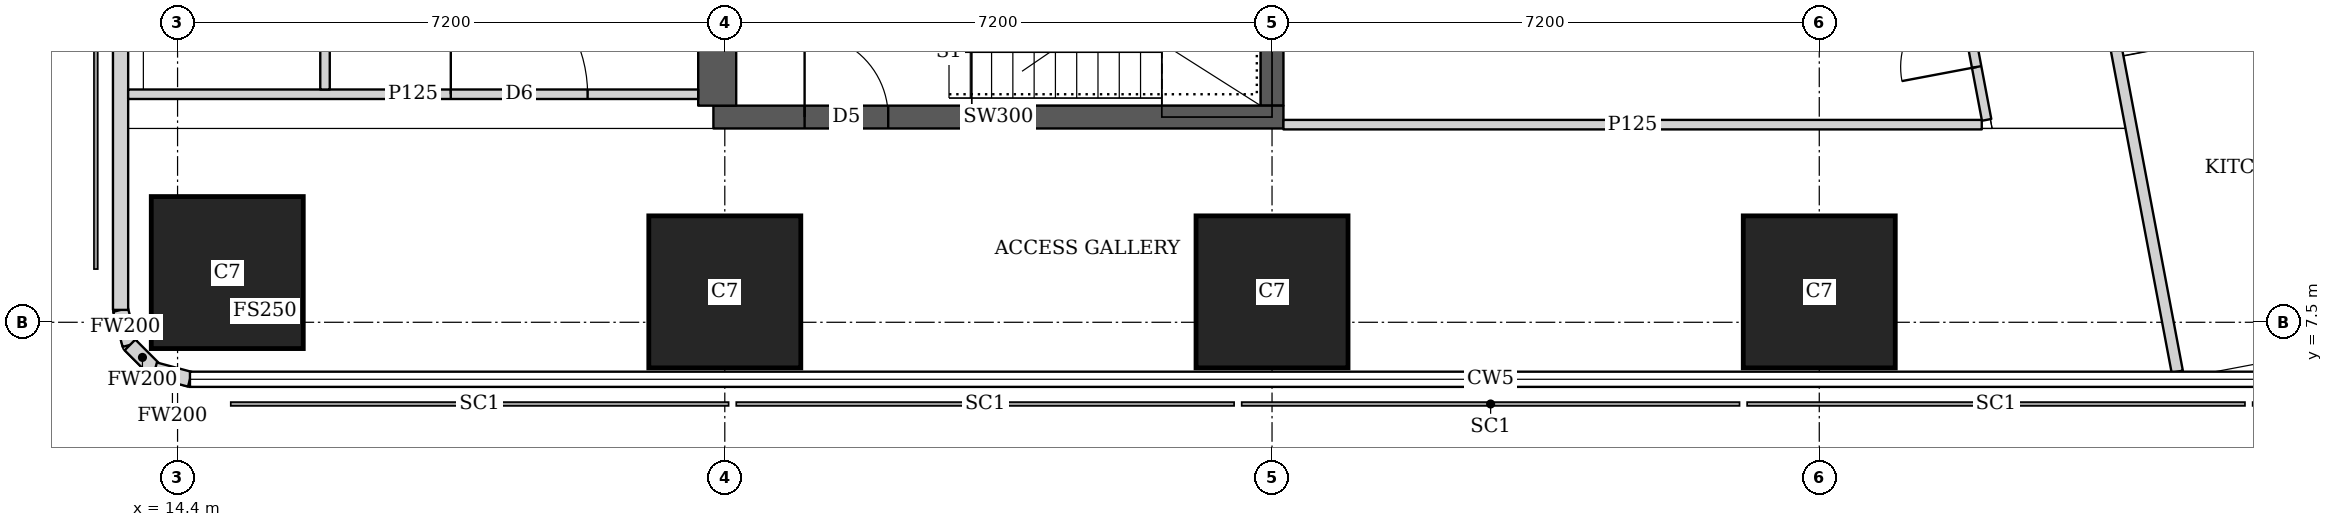
"""IFC4 building model, lengths in metres.
Left out: names, types, materials, properties, quantities, classifications, styles, units other than length and angle.
Written with IfcOpenShell. Run it as: python <this file> out.ifc"""

import sys

from ifc_helpers import new_model, si_unit, direction, frame, frame_2d, origin, origin_2d, place, context, subcontext, project, spatial, rectangle, extrude, element, fill, save


model = new_model("IFC4")
c1 = context("Model", 3, precision=1e-05, world=origin(), true_north=direction((0.0, 1.0)))
c2 = subcontext(c1, "Body", "Model", "MODEL_VIEW")
j1 = project(units=[si_unit("LENGTHUNIT", "METRE"), si_unit("PLANEANGLEUNIT", "RADIAN")], contexts=[c1])
p1 = place(None, origin())
s1 = spatial("IfcSite", under=j1, at=p1, CompositionType="ELEMENT")
p2 = place(p1, origin())
s2 = spatial("IfcBuilding", under=s1, at=p2, CompositionType="ELEMENT")
p3 = place(p2, frame((0.0, 0.0, 266.6)))
s3 = spatial("IfcBuildingStorey", under=s2, at=p3, CompositionType="ELEMENT", Elevation=266.6)
for number, where, z_axis, x_axis in (
    (1, (15.054, 8.154, 0.0), (0.0, 0.0, 1.0), (1.0, 0.0, 0.0)),
    (2, (21.6, 7.9, 0.0), (0.0, 0.0, 1.0), (1.0, 0.0, 0.0)),
    (3, (28.8, 7.9, 0.0), (0.0, 0.0, 1.0), (1.0, 0.0, 0.0)),
    (4, (36.0, 7.9, 0.0), (0.0, 0.0, 1.0), (1.0, 0.0, 0.0)),
):
    element("IfcColumn", number, at=place(p3, frame(where, z_axis=z_axis, x_axis=x_axis)), inside=s3, PredefinedType="COLUMN", context=c2, shape_type="SweptSolid", body=[
        extrude(rectangle(XDim=2.0, YDim=2.0, at=origin_2d()), origin(), (0.0, 0.0, 1.0), 3.75),
    ])
p4 = place(p3, frame((21.45, 10.2, 0.0), z_axis=(0.0, 0.0, 1.0), x_axis=(1.0, 0.0, 0.0)))
e5 = element("IfcWall", 5, at=p4, inside=s3, PredefinedType="SHEAR", context=c2, shape_type="SweptSolid", body=[
    extrude(rectangle(XDim=7.5, YDim=0.3, at=frame_2d((3.75, 0.0))), origin(), (0.0, 0.0, 1.0), 3.75),
])
p5 = place(p4, frame((1.2, 0.0, 0.0)))
e6 = element("IfcOpeningElement", 6, at=p5, cuts=e5, PredefinedType="OPENING", context=c2, shape_type="SweptSolid", body=[
    extrude(rectangle(XDim=1.1, YDim=2.1, at=frame_2d((0.55, 1.05))), frame((0.0, 0.16, 0.0), z_axis=(0.0, -1.0, 0.0), x_axis=(1.0, 0.0, 0.0)), (0.0, 0.0, 1.0), 0.32),
])
p6 = place(p3, frame((21.5, 10.35, 0.0), z_axis=(0.0, 0.0, 1.0), x_axis=(0.0, 1.0, 0.0)))
e7 = element("IfcWall", 7, at=p6, inside=s3, PredefinedType="SHEAR", context=c2, shape_type="SweptSolid", body=[
    extrude(rectangle(XDim=4.2, YDim=0.5, at=frame_2d((2.1, 0.0))), origin(), (0.0, 0.0, 1.0), 3.75),
])
p7 = place(p3, frame((28.8, 10.35, 0.0), z_axis=(0.0, 0.0, 1.0), x_axis=(0.0, 1.0, 0.0)))
e8 = element("IfcWall", 8, at=p7, inside=s3, PredefinedType="SHEAR", context=c2, shape_type="SweptSolid", body=[
    extrude(rectangle(XDim=4.2, YDim=0.3, at=frame_2d((2.1, 0.0))), origin(), (0.0, 0.0, 1.0), 3.75),
])
p8 = place(p3, frame((13.65, 43.037, 0.0), z_axis=(0.0, 0.0, 1.0), x_axis=(0.0, -1.0, 0.0)))
e9 = element("IfcWall", 9, at=p8, inside=s3, PredefinedType="SOLIDWALL", context=c2, shape_type="SweptSolid", body=[
    extrude(rectangle(XDim=35.374, YDim=0.2, at=frame_2d((17.687, 0.0))), origin(), (0.0, 0.0, 1.0), 3.5),
])
p9 = place(p8, frame((1.959, 0.0, 0.9)))
e10 = element("IfcOpeningElement", 10, at=p9, cuts=e9, PredefinedType="OPENING", context=c2, shape_type="SweptSolid", body=[
    extrude(rectangle(XDim=1.8, YDim=1.5, at=frame_2d((0.9, 0.75))), frame((0.0, 0.11, 0.0), z_axis=(0.0, -1.0, 0.0), x_axis=(1.0, 0.0, 0.0)), (0.0, 0.0, 1.0), 0.22),
])
p10 = place(p3, frame((13.65, 7.663, 0.0), z_axis=(0.0, 0.0, 1.0), x_axis=(0.259698463175, -0.965689757751, 0.0)))
e11 = element("IfcWall", 11, at=p10, inside=s3, PredefinedType="SOLIDWALL", context=c2, shape_type="SweptSolid", body=[
    extrude(rectangle(XDim=0.478, YDim=0.2, at=frame_2d((0.239, 0.0))), origin(), (0.0, 0.0, 1.0), 3.5),
])
p11 = place(p3, frame((13.774, 7.202, 0.0), z_axis=(0.0, 0.0, 1.0), x_axis=(0.707369890659, -0.706843573776, 0.0)))
e12 = element("IfcWall", 12, at=p11, inside=s3, PredefinedType="SOLIDWALL", context=c2, shape_type="SweptSolid", body=[
    extrude(rectangle(XDim=0.464, YDim=0.2, at=frame_2d((0.232, 0.0))), origin(), (0.0, 0.0, 1.0), 3.5),
])
p12 = place(p3, frame((14.102, 6.874, 0.0), z_axis=(0.0, 0.0, 1.0), x_axis=(0.965655254015, -0.259826731483, 0.0)))
e13 = element("IfcWall", 13, at=p12, inside=s3, PredefinedType="SOLIDWALL", context=c2, shape_type="SweptSolid", body=[
    extrude(rectangle(XDim=0.477, YDim=0.2, at=frame_2d((0.239, 0.0))), origin(), (0.0, 0.0, 1.0), 3.5),
])
p13 = place(p3, frame((34.036, 42.186, 0.0), z_axis=(0.0, 0.0, 1.0), x_axis=(0.185593518645, -0.9826266055, 0.0)))
e14 = element("IfcWall", 14, at=p13, inside=s3, PredefinedType="SOLIDWALL", context=c2, shape_type="SweptSolid", body=[
    extrude(rectangle(XDim=35.961, YDim=0.15, at=frame_2d((17.98, 0.0))), origin(), (0.0, 0.0, 1.0), 2.5),
])
p14 = place(p13, frame((15.529, 0.0, 0.0)))
e15 = element("IfcOpeningElement", 15, at=p14, cuts=e14, PredefinedType="OPENING", context=c2, shape_type="SweptSolid", body=[
    extrude(rectangle(XDim=1.0, YDim=2.1, at=frame_2d((0.5, 1.05))), frame((0.0, 0.085, 0.0), z_axis=(0.0, -1.0, 0.0), x_axis=(1.0, 0.0, 0.0)), (0.0, 0.0, 1.0), 0.17),
])
p15 = place(p13, frame((19.345, 0.0, 0.0)))
e16 = element("IfcOpeningElement", 16, at=p15, cuts=e14, PredefinedType="OPENING", context=c2, shape_type="SweptSolid", body=[
    extrude(rectangle(XDim=1.0, YDim=2.1, at=frame_2d((0.5, 1.05))), frame((0.0, 0.085, 0.0), z_axis=(0.0, -1.0, 0.0), x_axis=(1.0, 0.0, 0.0)), (0.0, 0.0, 1.0), 0.17),
])
p16 = place(p13, frame((30.594, 0.0, 0.0)))
e17 = element("IfcOpeningElement", 17, at=p16, cuts=e14, PredefinedType="OPENING", context=c2, shape_type="SweptSolid", body=[
    extrude(rectangle(XDim=1.0, YDim=2.1, at=frame_2d((0.5, 1.05))), frame((0.0, 0.085, 0.0), z_axis=(0.0, -1.0, 0.0), x_axis=(1.0, 0.0, 0.0)), (0.0, 0.0, 1.0), 0.17),
])
p17 = place(p3, frame((13.75, 10.5, 0.0), z_axis=(0.0, 0.0, 1.0), x_axis=(1.0, 0.0, 0.0)))
e18 = element("IfcWall", 18, at=p17, inside=s3, PredefinedType="PARTITIONING", context=c2, shape_type="SweptSolid", body=[
    extrude(rectangle(XDim=7.5, YDim=0.125, at=frame_2d((3.75, 0.0))), origin(), (0.0, 0.0, 1.0), 3.5),
])
p18 = place(p17, frame((4.245, 0.0, 0.0)))
e19 = element("IfcOpeningElement", 19, at=p18, cuts=e18, PredefinedType="OPENING", context=c2, shape_type="SweptSolid", body=[
    extrude(rectangle(XDim=1.8, YDim=2.1, at=frame_2d((0.9, 1.05))), frame((0.0, 0.073, 0.0), z_axis=(0.0, -1.0, 0.0), x_axis=(1.0, 0.0, 0.0)), (0.0, 0.0, 1.0), 0.145),
])
p19 = place(p3, frame((16.34, 10.562, 0.0), z_axis=(0.0, 0.0, 1.0), x_axis=(0.0, 1.0, 0.0)))
e20 = element("IfcWall", 20, at=p19, inside=s3, PredefinedType="PARTITIONING", context=c2, shape_type="SweptSolid", body=[
    extrude(rectangle(XDim=3.988, YDim=0.125, at=frame_2d((1.994, 0.0))), origin(), (0.0, 0.0, 1.0), 3.5),
])
p20 = place(p19, frame((1.438, 0.0, 0.0)))
e21 = element("IfcOpeningElement", 21, at=p20, cuts=e20, PredefinedType="OPENING", context=c2, shape_type="SweptSolid", body=[
    extrude(rectangle(XDim=1.0, YDim=2.1, at=frame_2d((0.5, 1.05))), frame((0.0, 0.073, 0.0), z_axis=(0.0, -1.0, 0.0), x_axis=(1.0, 0.0, 0.0)), (0.0, 0.0, 1.0), 0.145),
])
p21 = place(p3, frame((28.95, 10.1, 0.0), z_axis=(0.0, 0.0, 1.0), x_axis=(1.0, 0.0, 0.0)))
e22 = element("IfcWall", 22, at=p21, inside=s3, PredefinedType="PARTITIONING", context=c2, shape_type="SweptSolid", body=[
    extrude(rectangle(XDim=9.188, YDim=0.125, at=frame_2d((4.594, 0.0))), origin(), (0.0, 0.0, 1.0), 3.5),
])
p22 = place(p3, frame((38.202, 10.163, 0.0), z_axis=(0.0, 0.0, 1.0), x_axis=(-0.185610321132, 0.982623431783, 0.0)))
e23 = element("IfcWall", 23, at=p22, inside=s3, PredefinedType="PARTITIONING", context=c2, shape_type="SweptSolid", body=[
    extrude(rectangle(XDim=25.111, YDim=0.125, at=frame_2d((12.556, 0.0))), origin(), (0.0, 0.0, 1.0), 2.5),
])
p23 = place(p22, frame((0.708, 0.0, 0.0)))
e24 = element("IfcOpeningElement", 24, at=p23, cuts=e23, PredefinedType="OPENING", context=c2, shape_type="SweptSolid", body=[
    extrude(rectangle(XDim=1.0, YDim=2.1, at=frame_2d((0.5, 1.05))), frame((0.0, 0.073, 0.0), z_axis=(0.0, -1.0, 0.0), x_axis=(1.0, 0.0, 0.0)), (0.0, 0.0, 1.0), 0.145),
])
p24 = place(p22, frame((5.9, 0.0, 0.0)))
e25 = element("IfcOpeningElement", 25, at=p24, cuts=e23, PredefinedType="OPENING", context=c2, shape_type="SweptSolid", body=[
    extrude(rectangle(XDim=1.0, YDim=2.1, at=frame_2d((0.5, 1.05))), frame((0.0, 0.073, 0.0), z_axis=(0.0, -1.0, 0.0), x_axis=(1.0, 0.0, 0.0)), (0.0, 0.0, 1.0), 0.145),
])
p25 = place(p22, frame((13.378, 0.0, 0.0)))
e26 = element("IfcOpeningElement", 26, at=p25, cuts=e23, PredefinedType="OPENING", context=c2, shape_type="SweptSolid", body=[
    extrude(rectangle(XDim=1.0, YDim=2.1, at=frame_2d((0.5, 1.05))), frame((0.0, 0.073, 0.0), z_axis=(0.0, -1.0, 0.0), x_axis=(1.0, 0.0, 0.0)), (0.0, 0.0, 1.0), 0.145),
])
p26 = place(p22, frame((17.194, 0.0, 0.0)))
e27 = element("IfcOpeningElement", 27, at=p26, cuts=e23, PredefinedType="OPENING", context=c2, shape_type="SweptSolid", body=[
    extrude(rectangle(XDim=1.0, YDim=2.1, at=frame_2d((0.5, 1.05))), frame((0.0, 0.073, 0.0), z_axis=(0.0, -1.0, 0.0), x_axis=(1.0, 0.0, 0.0)), (0.0, 0.0, 1.0), 0.145),
])
p27 = place(p22, frame((21.15, 0.0, 0.0)))
e28 = element("IfcOpeningElement", 28, at=p27, cuts=e23, PredefinedType="OPENING", context=c2, shape_type="SweptSolid", body=[
    extrude(rectangle(XDim=1.0, YDim=2.1, at=frame_2d((0.5, 1.05))), frame((0.0, 0.073, 0.0), z_axis=(0.0, -1.0, 0.0), x_axis=(1.0, 0.0, 0.0)), (0.0, 0.0, 1.0), 0.145),
])
p28 = place(p18, origin())
e29 = element("IfcDoor", 29, at=p28, inside=s3, OperationType="DOUBLE_DOOR_SINGLE_SWING", PredefinedType="DOOR", context=c2, shape_type="SweptSolid", body=[
    extrude(rectangle(XDim=1.8, YDim=2.1, at=frame_2d((0.9, 1.05))), frame((0.0, 0.025, 0.0), z_axis=(0.0, -1.0, 0.0), x_axis=(1.0, 0.0, 0.0)), (0.0, 0.0, 1.0), 0.05),
])
fill(e19, e29)
p29 = place(p23, origin())
e30 = element("IfcDoor", 30, at=p29, inside=s3, OperationType="SINGLE_SWING_LEFT", PredefinedType="DOOR", context=c2, shape_type="SweptSolid", body=[
    extrude(rectangle(XDim=1.0, YDim=2.1, at=frame_2d((0.5, 1.05))), frame((0.0, 0.025, 0.0), z_axis=(0.0, -1.0, 0.0), x_axis=(1.0, 0.0, 0.0)), (0.0, 0.0, 1.0), 0.05),
])
fill(e24, e30)
p30 = place(p5, origin())
e31 = element("IfcDoor", 31, at=p30, inside=s3, OperationType="SINGLE_SWING_LEFT", PredefinedType="DOOR", context=c2, shape_type="SweptSolid", body=[
    extrude(rectangle(XDim=1.1, YDim=2.1, at=frame_2d((0.55, 1.05))), frame((0.0, 0.025, 0.0), z_axis=(0.0, -1.0, 0.0), x_axis=(1.0, 0.0, 0.0)), (0.0, 0.0, 1.0), 0.05),
])
fill(e6, e31)
save(model, sys.argv[1])
